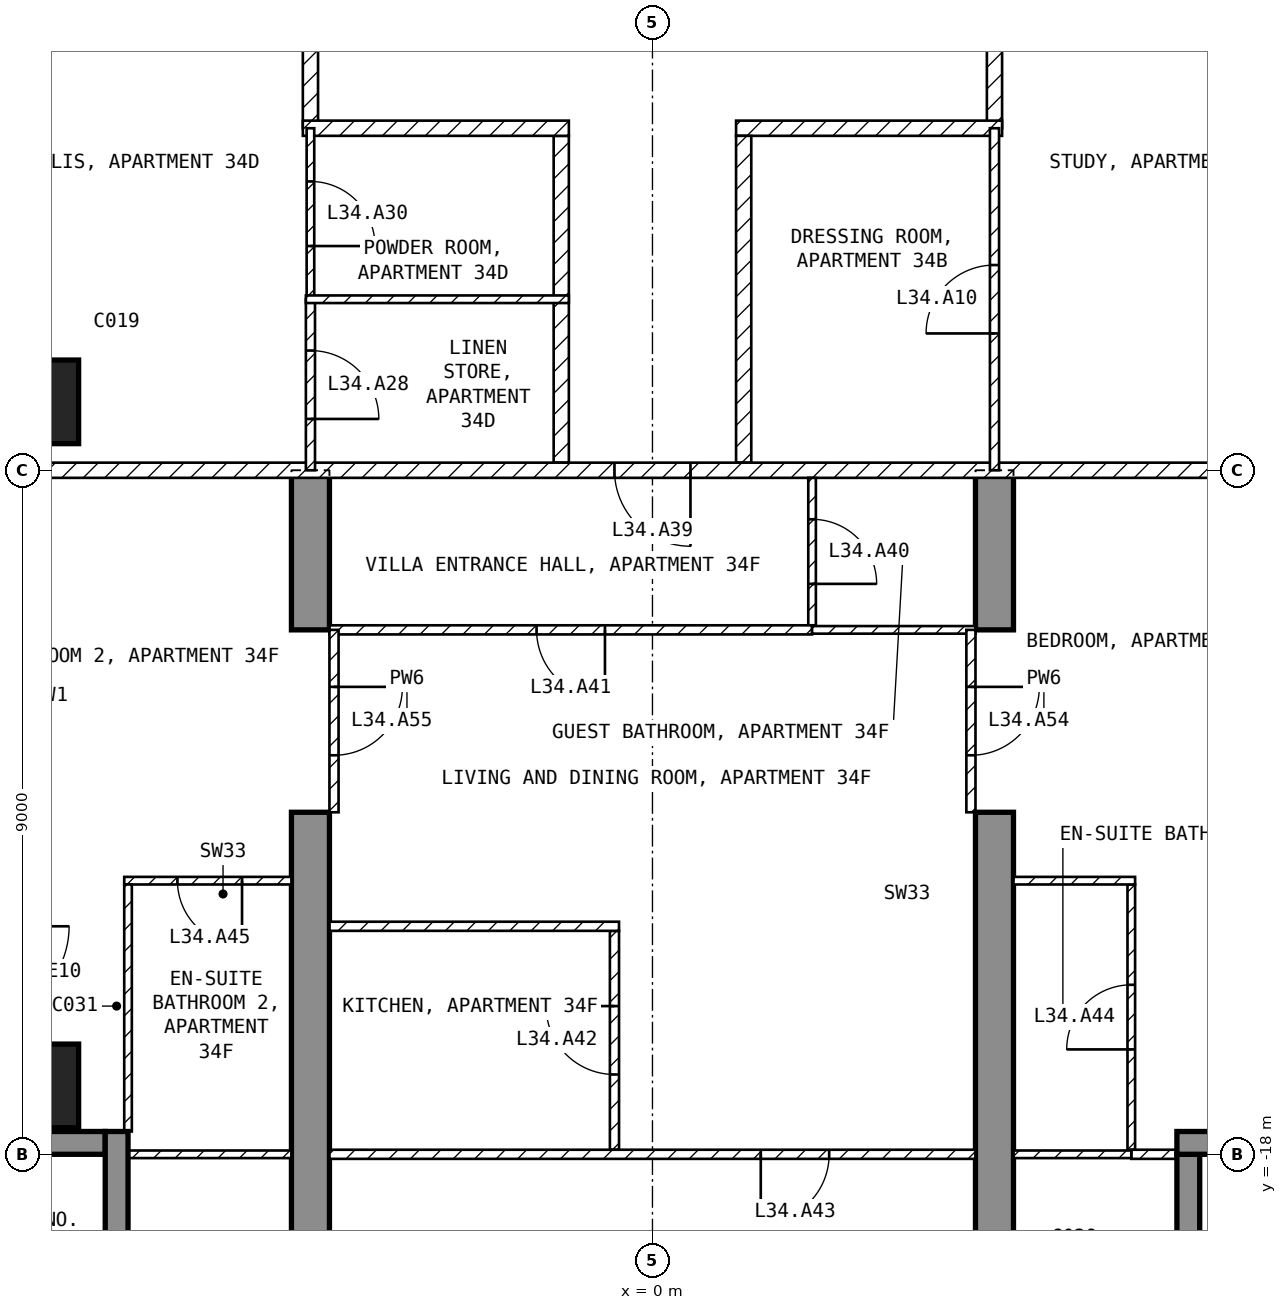
"""IFC4 building model, lengths in metres.
Left out: names, types, materials, properties, quantities, classifications, styles, units other than length and angle.
Written with IfcOpenShell. Run it as: python <this file> out.ifc"""

import sys

from ifc_helpers import new_model, si_unit, direction, frame, frame_2d, origin, origin_2d, place, context, subcontext, project, spatial, polyline, rectangle, outline, extrude, element, fill, save


model = new_model("IFC4")
c1 = context("Model", 3, precision=1e-05, world=origin(), true_north=direction((0.0, 1.0)))
c2 = subcontext(c1, "Body", "Model", "MODEL_VIEW")
j1 = project(units=[si_unit("LENGTHUNIT", "METRE"), si_unit("PLANEANGLEUNIT", "RADIAN")], contexts=[c1])
p1 = place(None, origin())
s1 = spatial("IfcSite", under=j1, at=p1, CompositionType="ELEMENT")
p2 = place(p1, origin())
s2 = spatial("IfcBuilding", under=s1, at=p2, CompositionType="ELEMENT")
p3 = place(p2, frame((0.0, 0.0, 140.9)))
s3 = spatial("IfcBuildingStorey", under=s2, at=p3, CompositionType="ELEMENT", Elevation=140.9)
for number, where, z_axis, x_axis in (
    (1, (-8.1, -17.1, -0.25), (0.0, 0.0, 1.0), (1.0, 0.0, 0.0)),
    (2, (-8.1, -8.1, -0.25), (0.0, 0.0, 1.0), (1.0, 0.0, 0.0)),
):
    element("IfcColumn", number, at=place(p3, frame(where, z_axis=z_axis, x_axis=x_axis)), inside=s3, PredefinedType="COLUMN", context=c2, shape_type="SweptSolid", body=[
        extrude(rectangle(XDim=1.1, YDim=1.1, at=origin_2d()), origin(), (0.0, 0.0, 1.0), 3.5),
    ])
for number, where, z_axis, x_axis in (
    (3, (-4.75, -20.15, -0.25), (1.0, 0.0, 0.0), (0.0, 1.0, 0.0)),
    (4, (4.25, -20.15, -0.25), (1.0, 0.0, 0.0), (0.0, 1.0, 0.0)),
):
    element("IfcWall", number, at=place(p3, frame(where, z_axis=z_axis, x_axis=x_axis)), inside=s3, PredefinedType="SHEAR", context=c2, shape_type="SweptSolid", body=[
        extrude(outline(polyline([(0.0, 0.0), (6.65, 0.0), (6.65, 2.65), (9.05, 2.65), (9.05, 0.0), (11.15, 0.0), (11.15, 3.5), (0.0, 3.5), (0.0, 0.0)])), origin(), (0.0, 0.0, 1.0), 0.5),
    ])
p4 = place(p3, frame((7.05, -19.8, 0.0), z_axis=(0.0, 0.0, 1.0), x_axis=(0.0, 1.0, 0.0)))
e5 = element("IfcWall", 5, at=p4, inside=s3, PredefinedType="SOLIDWALL", context=c2, shape_type="SweptSolid", body=[
    extrude(rectangle(XDim=1.8, YDim=0.3, at=frame_2d((0.9, 0.0))), origin(), (0.0, 0.0, 1.0), 3.25),
])
p5 = place(p3, frame((6.9, -17.85, 0.0), z_axis=(0.0, 0.0, 1.0), x_axis=(1.0, 0.0, 0.0)))
e6 = element("IfcWall", 6, at=p5, inside=s3, PredefinedType="SOLIDWALL", context=c2, shape_type="SweptSolid", body=[
    extrude(rectangle(XDim=1.85, YDim=0.3, at=frame_2d((0.925, 0.0))), origin(), (0.0, 0.0, 1.0), 3.25),
])
p6 = place(p3, frame((-8.75, -17.85, 0.0), z_axis=(0.0, 0.0, 1.0), x_axis=(1.0, 0.0, 0.0)))
e7 = element("IfcWall", 7, at=p6, inside=s3, PredefinedType="SOLIDWALL", context=c2, shape_type="SweptSolid", body=[
    extrude(rectangle(XDim=1.55, YDim=0.3, at=frame_2d((0.775, 0.0))), origin(), (0.0, 0.0, 1.0), 3.25),
])
p7 = place(p3, frame((-7.05, -17.7, 0.0), z_axis=(0.0, 0.0, 1.0), x_axis=(0.0, -1.0, 0.0)))
e8 = element("IfcWall", 8, at=p7, inside=s3, PredefinedType="SOLIDWALL", context=c2, shape_type="SweptSolid", body=[
    extrude(rectangle(XDim=1.8, YDim=0.3, at=frame_2d((0.9, 0.0))), origin(), (0.0, 0.0, 1.0), 3.25),
])
p8 = place(p3, frame((4.5, -1.3, 0.0), z_axis=(0.0, 0.0, 1.0), x_axis=(0.0, -1.0, 0.0)))
e9 = element("IfcWall", 9, at=p8, inside=s3, PredefinedType="PARTITIONING", context=c2, shape_type="SweptSolid", body=[
    extrude(rectangle(XDim=3.2, YDim=0.2, at=frame_2d((1.6, 0.0))), origin(), (0.0, 0.0, 1.0), 3.25),
])
p9 = place(p3, frame((4.6, -4.5, 0.0), z_axis=(0.0, 0.0, 1.0), x_axis=(-1.0, 0.0, 0.0)))
e10 = element("IfcWall", 10, at=p9, inside=s3, PredefinedType="PARTITIONING", context=c2, shape_type="SweptSolid", body=[
    extrude(rectangle(XDim=3.5, YDim=0.2, at=frame_2d((1.75, 0.0))), origin(), (0.0, 0.0, 1.0), 3.25),
])
p10 = place(p3, frame((1.2, -4.6, 0.0), z_axis=(0.0, 0.0, 1.0), x_axis=(0.0, -1.0, 0.0)))
e11 = element("IfcWall", 11, at=p10, inside=s3, PredefinedType="PARTITIONING", context=c2, shape_type="SweptSolid", body=[
    extrude(rectangle(XDim=4.3, YDim=0.2, at=frame_2d((2.15, 0.0))), origin(), (0.0, 0.0, 1.0), 3.25),
])
p11 = place(p3, frame((-4.5, -4.5, 0.0), z_axis=(0.0, 0.0, 1.0), x_axis=(0.0, 1.0, 0.0)))
e12 = element("IfcWall", 12, at=p11, inside=s3, PredefinedType="PARTITIONING", context=c2, shape_type="SweptSolid", body=[
    extrude(rectangle(XDim=3.2, YDim=0.2, at=frame_2d((1.6, 0.0))), origin(), (0.0, 0.0, 1.0), 3.25),
])
p12 = place(p3, frame((-1.2, -8.9, 0.0), z_axis=(0.0, 0.0, 1.0), x_axis=(0.0, 1.0, 0.0)))
e13 = element("IfcWall", 13, at=p12, inside=s3, PredefinedType="PARTITIONING", context=c2, shape_type="SweptSolid", body=[
    extrude(rectangle(XDim=4.3, YDim=0.2, at=frame_2d((2.15, 0.0))), origin(), (0.0, 0.0, 1.0), 3.25),
])
p13 = place(p3, frame((-1.1, -4.5, 0.0), z_axis=(0.0, 0.0, 1.0), x_axis=(-1.0, 0.0, 0.0)))
e14 = element("IfcWall", 14, at=p13, inside=s3, PredefinedType="PARTITIONING", context=c2, shape_type="SweptSolid", body=[
    extrude(rectangle(XDim=3.5, YDim=0.2, at=frame_2d((1.75, 0.0))), origin(), (0.0, 0.0, 1.0), 3.25),
])
p14 = place(p3, frame((8.92, -9.0, 0.0), z_axis=(0.0, 0.0, 1.0), x_axis=(-1.0, 0.0, 0.0)))
e15 = element("IfcWall", 15, at=p14, inside=s3, PredefinedType="PARTITIONING", context=c2, shape_type="SweptSolid", body=[
    extrude(rectangle(XDim=17.84, YDim=0.2, at=frame_2d((8.92, 0.0))), origin(), (0.0, 0.0, 1.0), 3.25),
])
p15 = place(p14, frame((8.42, 0.0, 0.0)))
e16 = element("IfcOpeningElement", 16, at=p15, cuts=e15, PredefinedType="OPENING", context=c2, shape_type="SweptSolid", body=[
    extrude(rectangle(XDim=1.0, YDim=2.1, at=frame_2d((0.5, 1.05))), frame((0.0, 0.11, 0.0), z_axis=(0.0, -1.0, 0.0), x_axis=(1.0, 0.0, 0.0)), (0.0, 0.0, 1.0), 0.22),
])
p16 = place(p3, frame((4.5, -9.0, 0.0), z_axis=(0.0, 0.0, 1.0), x_axis=(0.0, 1.0, 0.0)))
e17 = element("IfcWall", 17, at=p16, inside=s3, PredefinedType="PARTITIONING", context=c2, shape_type="SweptSolid", body=[
    extrude(rectangle(XDim=4.5, YDim=0.12, at=frame_2d((2.25, 0.0))), origin(), (0.0, 0.0, 1.0), 3.25),
])
p17 = place(p16, frame((1.8, 0.0, 0.0)))
e18 = element("IfcOpeningElement", 18, at=p17, cuts=e17, PredefinedType="OPENING", context=c2, shape_type="SweptSolid", body=[
    extrude(rectangle(XDim=0.9, YDim=2.1, at=frame_2d((0.45, 1.05))), frame((0.0, 0.07, 0.0), z_axis=(0.0, -1.0, 0.0), x_axis=(1.0, 0.0, 0.0)), (0.0, 0.0, 1.0), 0.14),
])
p18 = place(p3, frame((-4.5, -4.5, 0.0), z_axis=(0.0, 0.0, 1.0), x_axis=(0.0, -1.0, 0.0)))
e19 = element("IfcWall", 19, at=p18, inside=s3, PredefinedType="PARTITIONING", context=c2, shape_type="SweptSolid", body=[
    extrude(rectangle(XDim=2.25, YDim=0.1, at=frame_2d((1.125, 0.0))), origin(), (0.0, 0.0, 1.0), 3.25),
])
p19 = place(p18, frame((0.7, 0.0, 0.0)))
e20 = element("IfcOpeningElement", 20, at=p19, cuts=e19, PredefinedType="OPENING", context=c2, shape_type="SweptSolid", body=[
    extrude(rectangle(XDim=0.85, YDim=2.1, at=frame_2d((0.425, 1.05))), frame((0.0, 0.06, 0.0), z_axis=(0.0, -1.0, 0.0), x_axis=(1.0, 0.0, 0.0)), (0.0, 0.0, 1.0), 0.12),
])
p20 = place(p3, frame((-4.5, -6.75, 0.0), z_axis=(0.0, 0.0, 1.0), x_axis=(0.0, -1.0, 0.0)))
e21 = element("IfcWall", 21, at=p20, inside=s3, PredefinedType="PARTITIONING", context=c2, shape_type="SweptSolid", body=[
    extrude(rectangle(XDim=2.25, YDim=0.12, at=frame_2d((1.125, 0.0))), origin(), (0.0, 0.0, 1.0), 3.25),
])
p21 = place(p20, frame((0.675, 0.0, 0.0)))
e22 = element("IfcOpeningElement", 22, at=p21, cuts=e21, PredefinedType="OPENING", context=c2, shape_type="SweptSolid", body=[
    extrude(rectangle(XDim=0.9, YDim=2.1, at=frame_2d((0.45, 1.05))), frame((0.0, 0.07, 0.0), z_axis=(0.0, -1.0, 0.0), x_axis=(1.0, 0.0, 0.0)), (0.0, 0.0, 1.0), 0.14),
])
p22 = place(p3, frame((-1.1, -6.75, 0.0), z_axis=(0.0, 0.0, 1.0), x_axis=(-1.0, 0.0, 0.0)))
e23 = element("IfcWall", 23, at=p22, inside=s3, PredefinedType="PARTITIONING", context=c2, shape_type="SweptSolid", body=[
    extrude(rectangle(XDim=3.46, YDim=0.1, at=frame_2d((1.73, 0.0))), origin(), (0.0, 0.0, 1.0), 3.25),
])
p23 = place(p3, frame((2.1, -9.1, 0.0), z_axis=(0.0, 0.0, 1.0), x_axis=(0.0, -1.0, 0.0)))
e24 = element("IfcWall", 24, at=p23, inside=s3, PredefinedType="PARTITIONING", context=c2, shape_type="SweptSolid", body=[
    extrude(rectangle(XDim=1.94, YDim=0.1, at=frame_2d((0.97, 0.0))), origin(), (0.0, 0.0, 1.0), 3.25),
])
p24 = place(p23, frame((0.545, 0.0, 0.0)))
e25 = element("IfcOpeningElement", 25, at=p24, cuts=e24, PredefinedType="OPENING", context=c2, shape_type="SweptSolid", body=[
    extrude(rectangle(XDim=0.85, YDim=2.1, at=frame_2d((0.425, 1.05))), frame((0.0, 0.06, 0.0), z_axis=(0.0, -1.0, 0.0), x_axis=(1.0, 0.0, 0.0)), (0.0, 0.0, 1.0), 0.12),
])
p25 = place(p3, frame((2.1, -11.1, 0.0), z_axis=(0.0, 0.0, 1.0), x_axis=(-1.0, 0.0, 0.0)))
e26 = element("IfcWall", 26, at=p25, inside=s3, PredefinedType="PARTITIONING", context=c2, shape_type="SweptSolid", body=[
    extrude(rectangle(XDim=6.35, YDim=0.12, at=frame_2d((3.175, 0.0))), origin(), (0.0, 0.0, 1.0), 3.25),
])
p26 = place(p25, frame((2.725, 0.0, 0.0)))
e27 = element("IfcOpeningElement", 27, at=p26, cuts=e26, PredefinedType="OPENING", context=c2, shape_type="SweptSolid", body=[
    extrude(rectangle(XDim=0.9, YDim=2.1, at=frame_2d((0.45, 1.05))), frame((0.0, 0.07, 0.0), z_axis=(0.0, -1.0, 0.0), x_axis=(1.0, 0.0, 0.0)), (0.0, 0.0, 1.0), 0.14),
])
p27 = place(p3, frame((4.25, -11.1, 0.0), z_axis=(0.0, 0.0, 1.0), x_axis=(-1.0, 0.0, 0.0)))
e28 = element("IfcWall", 28, at=p27, inside=s3, PredefinedType="PARTITIONING", context=c2, shape_type="SweptSolid", body=[
    extrude(rectangle(XDim=2.15, YDim=0.1, at=frame_2d((1.075, 0.0))), origin(), (0.0, 0.0, 1.0), 3.25),
])
p28 = place(p3, frame((-0.5, -17.94, 0.0), z_axis=(0.0, 0.0, 1.0), x_axis=(0.0, 1.0, 0.0)))
e29 = element("IfcWall", 29, at=p28, inside=s3, PredefinedType="PARTITIONING", context=c2, shape_type="SweptSolid", body=[
    extrude(rectangle(XDim=2.88, YDim=0.12, at=frame_2d((1.44, 0.0))), origin(), (0.0, 0.0, 1.0), 3.25),
])
p29 = place(p28, frame((0.99, 0.0, 0.0)))
e30 = element("IfcOpeningElement", 30, at=p29, cuts=e29, PredefinedType="OPENING", context=c2, shape_type="SweptSolid", body=[
    extrude(rectangle(XDim=0.9, YDim=2.1, at=frame_2d((0.45, 1.05))), frame((0.0, 0.07, 0.0), z_axis=(0.0, -1.0, 0.0), x_axis=(1.0, 0.0, 0.0)), (0.0, 0.0, 1.0), 0.14),
])
p30 = place(p3, frame((-0.44, -15.0, 0.0), z_axis=(0.0, 0.0, 1.0), x_axis=(-1.0, 0.0, 0.0)))
e31 = element("IfcWall", 31, at=p30, inside=s3, PredefinedType="PARTITIONING", context=c2, shape_type="SweptSolid", body=[
    extrude(rectangle(XDim=3.81, YDim=0.12, at=frame_2d((1.905, 0.0))), origin(), (0.0, 0.0, 1.0), 3.25),
])
p31 = place(p3, frame((4.25, -18.0, 0.0), z_axis=(0.0, 0.0, 1.0), x_axis=(-1.0, 0.0, 0.0)))
e32 = element("IfcWall", 32, at=p31, inside=s3, PredefinedType="PARTITIONING", context=c2, shape_type="SweptSolid", body=[
    extrude(rectangle(XDim=8.5, YDim=0.12, at=frame_2d((4.25, 0.0))), origin(), (0.0, 0.0, 1.0), 3.25),
])
p32 = place(p31, frame((1.925, 0.0, 0.0)))
e33 = element("IfcOpeningElement", 33, at=p32, cuts=e32, PredefinedType="OPENING", context=c2, shape_type="SweptSolid", body=[
    extrude(rectangle(XDim=0.9, YDim=2.1, at=frame_2d((0.45, 1.05))), frame((0.0, 0.07, 0.0), z_axis=(0.0, -1.0, 0.0), x_axis=(1.0, 0.0, 0.0)), (0.0, 0.0, 1.0), 0.14),
])
p33 = place(p3, frame((6.3, -17.94, 0.0), z_axis=(0.0, 0.0, 1.0), x_axis=(0.0, 1.0, 0.0)))
e34 = element("IfcWall", 34, at=p33, inside=s3, PredefinedType="PARTITIONING", context=c2, shape_type="SweptSolid", body=[
    extrude(rectangle(XDim=3.49, YDim=0.1, at=frame_2d((1.745, 0.0))), origin(), (0.0, 0.0, 1.0), 3.25),
])
p34 = place(p33, frame((1.32, 0.0, 0.0)))
e35 = element("IfcOpeningElement", 35, at=p34, cuts=e34, PredefinedType="OPENING", context=c2, shape_type="SweptSolid", body=[
    extrude(rectangle(XDim=0.85, YDim=2.1, at=frame_2d((0.425, 1.05))), frame((0.0, 0.06, 0.0), z_axis=(0.0, -1.0, 0.0), x_axis=(1.0, 0.0, 0.0)), (0.0, 0.0, 1.0), 0.12),
])
p35 = place(p3, frame((6.35, -14.4, 0.0), z_axis=(0.0, 0.0, 1.0), x_axis=(-1.0, 0.0, 0.0)))
e36 = element("IfcWall", 36, at=p35, inside=s3, PredefinedType="PARTITIONING", context=c2, shape_type="SweptSolid", body=[
    extrude(rectangle(XDim=1.6, YDim=0.1, at=frame_2d((0.8, 0.0))), origin(), (0.0, 0.0, 1.0), 3.25),
])
p36 = place(p3, frame((7.12, -18.0, 0.0), z_axis=(0.0, 0.0, 1.0), x_axis=(-1.0, 0.0, 0.0)))
e37 = element("IfcWall", 37, at=p36, inside=s3, PredefinedType="PARTITIONING", context=c2, shape_type="SweptSolid", body=[
    extrude(rectangle(XDim=0.82, YDim=0.12, at=frame_2d((0.41, 0.0))), origin(), (0.0, 0.0, 1.0), 3.25),
])
p37 = place(p3, frame((6.3, -18.0, 0.0), z_axis=(0.0, 0.0, 1.0), x_axis=(-1.0, 0.0, 0.0)))
e38 = element("IfcWall", 38, at=p37, inside=s3, PredefinedType="PARTITIONING", context=c2, shape_type="SweptSolid", body=[
    extrude(rectangle(XDim=1.55, YDim=0.1, at=frame_2d((0.775, 0.0))), origin(), (0.0, 0.0, 1.0), 3.25),
])
p38 = place(p3, frame((-4.75, -14.4, 0.0), z_axis=(0.0, 0.0, 1.0), x_axis=(-1.0, 0.0, 0.0)))
e39 = element("IfcWall", 39, at=p38, inside=s3, PredefinedType="PARTITIONING", context=c2, shape_type="SweptSolid", body=[
    extrude(rectangle(XDim=2.2, YDim=0.1, at=frame_2d((1.1, 0.0))), origin(), (0.0, 0.0, 1.0), 3.25),
])
p39 = place(p38, frame((0.65, 0.0, 0.0)))
e40 = element("IfcOpeningElement", 40, at=p39, cuts=e39, PredefinedType="OPENING", context=c2, shape_type="SweptSolid", body=[
    extrude(rectangle(XDim=0.85, YDim=2.1, at=frame_2d((0.425, 1.05))), frame((0.0, 0.06, 0.0), z_axis=(0.0, -1.0, 0.0), x_axis=(1.0, 0.0, 0.0)), (0.0, 0.0, 1.0), 0.12),
])
p40 = place(p3, frame((-6.9, -14.45, 0.0), z_axis=(0.0, 0.0, 1.0), x_axis=(0.0, -1.0, 0.0)))
e41 = element("IfcWall", 41, at=p40, inside=s3, PredefinedType="PARTITIONING", context=c2, shape_type="SweptSolid", body=[
    extrude(rectangle(XDim=3.25, YDim=0.1, at=frame_2d((1.625, 0.0))), origin(), (0.0, 0.0, 1.0), 3.25),
])
p41 = place(p3, frame((-4.75, -18.0, 0.0), z_axis=(0.0, 0.0, 1.0), x_axis=(-1.0, 0.0, 0.0)))
e42 = element("IfcWall", 42, at=p41, inside=s3, PredefinedType="PARTITIONING", context=c2, shape_type="SweptSolid", body=[
    extrude(rectangle(XDim=2.37, YDim=0.1, at=frame_2d((1.185, 0.0))), origin(), (0.0, 0.0, 1.0), 3.25),
])
p42 = place(p3, frame((4.19, -11.1, 0.0), z_axis=(0.0, 0.0, 1.0), x_axis=(0.0, -1.0, 0.0)))
e43 = element("IfcWall", 43, at=p42, inside=s3, PredefinedType="PARTITIONING", context=c2, shape_type="SweptSolid", body=[
    extrude(rectangle(XDim=2.4, YDim=0.12, at=frame_2d((1.2, 0.0))), origin(), (0.0, 0.0, 1.0), 2.4),
])
p43 = place(p42, frame((0.75, 0.0, 0.0)))
e44 = element("IfcOpeningElement", 44, at=p43, cuts=e43, PredefinedType="OPENING", context=c2, shape_type="SweptSolid", body=[
    extrude(rectangle(XDim=0.9, YDim=2.1, at=frame_2d((0.45, 1.05))), frame((0.0, 0.07, 0.0), z_axis=(0.0, -1.0, 0.0), x_axis=(1.0, 0.0, 0.0)), (0.0, 0.0, 1.0), 0.14),
])
p44 = place(p3, frame((-4.19, -11.1, 0.0), z_axis=(0.0, 0.0, 1.0), x_axis=(0.0, -1.0, 0.0)))
e45 = element("IfcWall", 45, at=p44, inside=s3, PredefinedType="PARTITIONING", context=c2, shape_type="SweptSolid", body=[
    extrude(rectangle(XDim=2.4, YDim=0.12, at=frame_2d((1.2, 0.0))), origin(), (0.0, 0.0, 1.0), 2.4),
])
p45 = place(p44, frame((0.75, 0.0, 0.0)))
e46 = element("IfcOpeningElement", 46, at=p45, cuts=e45, PredefinedType="OPENING", context=c2, shape_type="SweptSolid", body=[
    extrude(rectangle(XDim=0.9, YDim=2.1, at=frame_2d((0.45, 1.05))), frame((0.0, 0.07, 0.0), z_axis=(0.0, -1.0, 0.0), x_axis=(1.0, 0.0, 0.0)), (0.0, 0.0, 1.0), 0.14),
])
p46 = place(p17, origin())
e47 = element("IfcDoor", 47, at=p46, inside=s3, OperationType="SINGLE_SWING_LEFT", PredefinedType="DOOR", context=c2, shape_type="SweptSolid", body=[
    extrude(rectangle(XDim=0.9, YDim=2.1, at=frame_2d((0.45, 1.05))), frame((0.0, 0.025, 0.0), z_axis=(0.0, -1.0, 0.0), x_axis=(1.0, 0.0, 0.0)), (0.0, 0.0, 1.0), 0.05),
])
fill(e18, e47)
p47 = place(p21, origin())
e48 = element("IfcDoor", 48, at=p47, inside=s3, OperationType="SINGLE_SWING_RIGHT", PredefinedType="DOOR", context=c2, shape_type="SweptSolid", body=[
    extrude(rectangle(XDim=0.9, YDim=2.1, at=frame_2d((0.45, 1.05))), frame((0.0, 0.025, 0.0), z_axis=(0.0, -1.0, 0.0), x_axis=(1.0, 0.0, 0.0)), (0.0, 0.0, 1.0), 0.05),
])
fill(e22, e48)
p48 = place(p19, origin())
e49 = element("IfcDoor", 49, at=p48, inside=s3, OperationType="SINGLE_SWING_RIGHT", PredefinedType="DOOR", context=c2, shape_type="SweptSolid", body=[
    extrude(rectangle(XDim=0.85, YDim=2.1, at=frame_2d((0.425, 1.05))), frame((0.0, 0.025, 0.0), z_axis=(0.0, -1.0, 0.0), x_axis=(1.0, 0.0, 0.0)), (0.0, 0.0, 1.0), 0.05),
])
fill(e20, e49)
p49 = place(p15, origin())
e50 = element("IfcDoor", 50, at=p49, inside=s3, OperationType="SINGLE_SWING_LEFT", PredefinedType="DOOR", context=c2, shape_type="SweptSolid", body=[
    extrude(rectangle(XDim=1.0, YDim=2.1, at=frame_2d((0.5, 1.05))), frame((0.0, 0.025, 0.0), z_axis=(0.0, -1.0, 0.0), x_axis=(1.0, 0.0, 0.0)), (0.0, 0.0, 1.0), 0.05),
])
fill(e16, e50)
p50 = place(p24, origin())
e51 = element("IfcDoor", 51, at=p50, inside=s3, OperationType="SINGLE_SWING_RIGHT", PredefinedType="DOOR", context=c2, shape_type="SweptSolid", body=[
    extrude(rectangle(XDim=0.85, YDim=2.1, at=frame_2d((0.425, 1.05))), frame((0.0, 0.025, 0.0), z_axis=(0.0, -1.0, 0.0), x_axis=(1.0, 0.0, 0.0)), (0.0, 0.0, 1.0), 0.05),
])
fill(e25, e51)
p51 = place(p26, origin())
e52 = element("IfcDoor", 52, at=p51, inside=s3, OperationType="SINGLE_SWING_LEFT", PredefinedType="DOOR", context=c2, shape_type="SweptSolid", body=[
    extrude(rectangle(XDim=0.9, YDim=2.1, at=frame_2d((0.45, 1.05))), frame((0.0, 0.025, 0.0), z_axis=(0.0, -1.0, 0.0), x_axis=(1.0, 0.0, 0.0)), (0.0, 0.0, 1.0), 0.05),
])
fill(e27, e52)
p52 = place(p29, origin())
e53 = element("IfcDoor", 53, at=p52, inside=s3, OperationType="SINGLE_SWING_RIGHT", PredefinedType="DOOR", context=c2, shape_type="SweptSolid", body=[
    extrude(rectangle(XDim=0.9, YDim=2.1, at=frame_2d((0.45, 1.05))), frame((0.0, 0.025, 0.0), z_axis=(0.0, -1.0, 0.0), x_axis=(1.0, 0.0, 0.0)), (0.0, 0.0, 1.0), 0.05),
])
fill(e30, e53)
p53 = place(p32, origin())
e54 = element("IfcDoor", 54, at=p53, inside=s3, OperationType="SINGLE_SWING_RIGHT", PredefinedType="DOOR", context=c2, shape_type="SweptSolid", body=[
    extrude(rectangle(XDim=0.9, YDim=2.1, at=frame_2d((0.45, 1.05))), frame((0.0, 0.025, 0.0), z_axis=(0.0, -1.0, 0.0), x_axis=(1.0, 0.0, 0.0)), (0.0, 0.0, 1.0), 0.05),
])
fill(e33, e54)
p54 = place(p34, origin())
e55 = element("IfcDoor", 55, at=p54, inside=s3, OperationType="SINGLE_SWING_LEFT", PredefinedType="DOOR", context=c2, shape_type="SweptSolid", body=[
    extrude(rectangle(XDim=0.85, YDim=2.1, at=frame_2d((0.425, 1.05))), frame((0.0, 0.025, 0.0), z_axis=(0.0, -1.0, 0.0), x_axis=(1.0, 0.0, 0.0)), (0.0, 0.0, 1.0), 0.05),
])
fill(e35, e55)
p55 = place(p39, origin())
e56 = element("IfcDoor", 56, at=p55, inside=s3, OperationType="SINGLE_SWING_LEFT", PredefinedType="DOOR", context=c2, shape_type="SweptSolid", body=[
    extrude(rectangle(XDim=0.85, YDim=2.1, at=frame_2d((0.425, 1.05))), frame((0.0, 0.025, 0.0), z_axis=(0.0, -1.0, 0.0), x_axis=(1.0, 0.0, 0.0)), (0.0, 0.0, 1.0), 0.05),
])
fill(e40, e56)
p56 = place(p43, origin())
e57 = element("IfcDoor", 57, at=p56, inside=s3, OperationType="SINGLE_SWING_LEFT", PredefinedType="DOOR", context=c2, shape_type="SweptSolid", body=[
    extrude(rectangle(XDim=0.9, YDim=2.1, at=frame_2d((0.45, 1.05))), frame((0.0, 0.025, 0.0), z_axis=(0.0, -1.0, 0.0), x_axis=(1.0, 0.0, 0.0)), (0.0, 0.0, 1.0), 0.05),
])
fill(e44, e57)
p57 = place(p45, origin())
e58 = element("IfcDoor", 58, at=p57, inside=s3, OperationType="SINGLE_SWING_LEFT", PredefinedType="DOOR", context=c2, shape_type="SweptSolid", body=[
    extrude(rectangle(XDim=0.9, YDim=2.1, at=frame_2d((0.45, 1.05))), frame((0.0, 0.025, 0.0), z_axis=(0.0, -1.0, 0.0), x_axis=(1.0, 0.0, 0.0)), (0.0, 0.0, 1.0), 0.05),
])
fill(e46, e58)
save(model, sys.argv[1])
